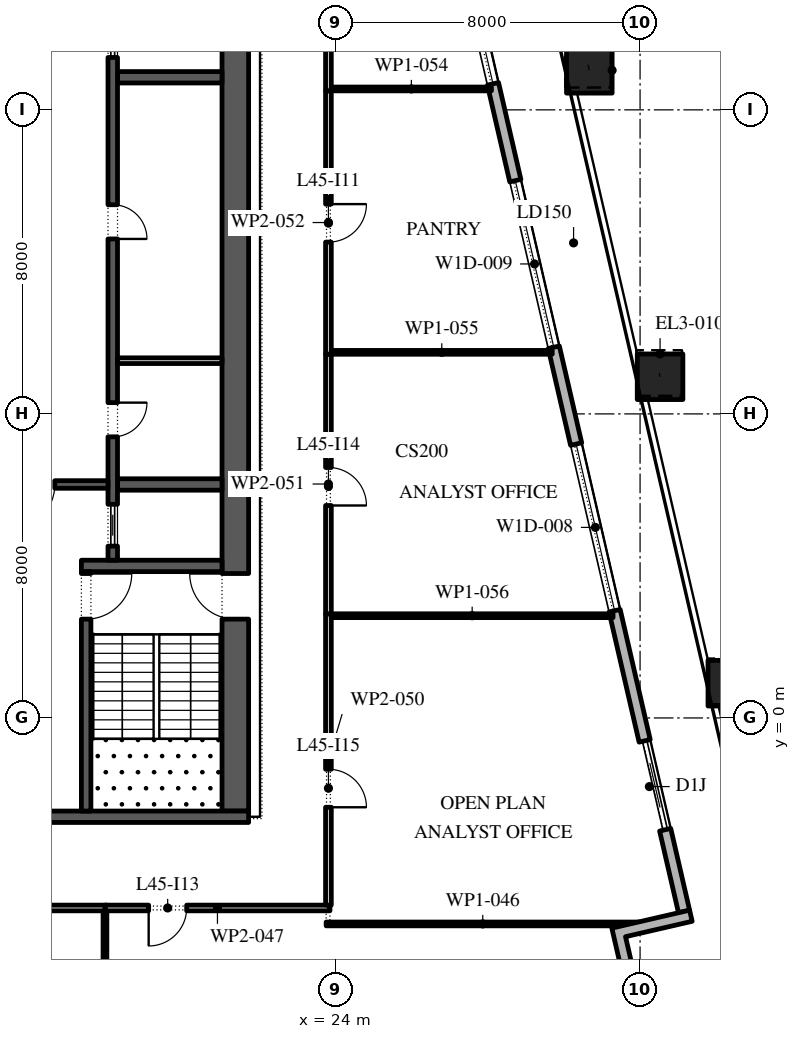
"""IFC4 building model, lengths in metres.
Left out: names, types, materials, properties, quantities, classifications, styles, units other than length and angle.
Written with IfcOpenShell. Run it as: python <this file> out.ifc"""

import sys

from ifc_helpers import new_model, si_unit, direction, frame, frame_2d, origin, origin_2d, place, context, subcontext, project, spatial, polyline, rectangle, outline, extrude, element, fill, save


model = new_model("IFC4")
c1 = context("Model", 3, precision=1e-05, world=origin(), true_north=direction((0.0, 1.0)))
c2 = subcontext(c1, "Body", "Model", "MODEL_VIEW")
j1 = project(units=[si_unit("LENGTHUNIT", "METRE"), si_unit("PLANEANGLEUNIT", "RADIAN")], contexts=[c1])
p1 = place(None, origin())
s1 = spatial("IfcSite", under=j1, at=p1, CompositionType="ELEMENT")
p2 = place(p1, origin())
s2 = spatial("IfcBuilding", under=s1, at=p2, CompositionType="ELEMENT")
p3 = place(p2, frame((0.0, 0.0, 205.2)))
s3 = spatial("IfcBuildingStorey", under=s2, at=p3, CompositionType="ELEMENT", Elevation=205.2)
p4 = place(p3, frame((34.388, 0.914, 0.0), z_axis=(-0.002731884952, 0.01168316756, 0.999928017609), x_axis=(-0.973733900744, -0.227689021567, 0.0)))
e1 = element("IfcColumn", 1, at=p4, inside=s3, PredefinedType="COLUMN", context=c2, shape_type="SweptSolid", body=[
    extrude(rectangle(XDim=1.2, YDim=1.2, at=origin_2d()), origin(), (0.0, 0.0, 1.0), 4.2),
])
p5 = place(p3, frame((32.526, 8.977, 0.0), z_axis=(-0.005404479485, 0.023361298418, 0.999712479335), x_axis=(-0.974268511785, -0.225390476607, 0.0)))
e2 = element("IfcColumn", 2, at=p5, inside=s3, PredefinedType="COLUMN", context=c2, shape_type="SweptSolid", body=[
    extrude(rectangle(XDim=1.2, YDim=1.2, at=origin_2d()), origin(), (0.0, 0.0, 1.0), 4.201),
])
p6 = place(p3, frame((30.665, 17.041, 0.0), z_axis=(-0.0080747472, 0.035087390713, 0.999351626541), x_axis=(-0.974526982896, -0.224270282488, 0.0)))
e3 = element("IfcColumn", 3, at=p6, inside=s3, PredefinedType="COLUMN", context=c2, shape_type="SweptSolid", body=[
    extrude(rectangle(XDim=1.2, YDim=1.2, at=origin_2d()), origin(), (0.0, 0.0, 1.0), 4.203),
])
p7 = place(p3, frame((33.157, -5.092, 0.0), z_axis=(0.0, 0.0, 1.0), x_axis=(-0.224950279389, 0.974370243697, 0.0)))
e4 = element("IfcWall", 4, at=p7, inside=s3, PredefinedType="STANDARD", context=c2, shape_type="SweptSolid", body=[
    extrude(rectangle(XDim=49.5, YDim=0.3, at=frame_2d((24.75, 0.0))), origin(), (0.0, 0.0, 1.0), 4.0),
])
p8 = place(p7, frame((2.207, 0.0, 0.0)))
e5 = element("IfcOpeningElement", 5, at=p8, cuts=e4, PredefinedType="OPENING", context=c2, shape_type="SweptSolid", body=[
    extrude(rectangle(XDim=2.4, YDim=3.125, at=frame_2d((1.2, 1.562))), frame((0.0, 0.16, 0.0), z_axis=(0.0, -1.0, 0.0), x_axis=(1.0, 0.0, 0.0)), (0.0, 0.0, 1.0), 0.32),
])
p9 = place(p7, frame((8.121, 0.0, 0.45)))
e6 = element("IfcOpeningElement", 6, at=p9, cuts=e4, PredefinedType="OPENING", context=c2, shape_type="SweptSolid", body=[
    extrude(rectangle(XDim=4.5, YDim=2.875, at=frame_2d((2.25, 1.438))), frame((0.0, 0.16, 0.0), z_axis=(0.0, -1.0, 0.0), x_axis=(1.0, 0.0, 0.0)), (0.0, 0.0, 1.0), 0.32),
])
p10 = place(p7, frame((15.236, 0.0, 0.45)))
e7 = element("IfcOpeningElement", 7, at=p10, cuts=e4, PredefinedType="OPENING", context=c2, shape_type="SweptSolid", body=[
    extrude(rectangle(XDim=4.5, YDim=2.875, at=frame_2d((2.25, 1.438))), frame((0.0, 0.16, 0.0), z_axis=(0.0, -1.0, 0.0), x_axis=(1.0, 0.0, 0.0)), (0.0, 0.0, 1.0), 0.32),
])
p11 = place(p7, frame((22.35, 0.0, 0.45)))
e8 = element("IfcOpeningElement", 8, at=p11, cuts=e4, PredefinedType="OPENING", context=c2, shape_type="SweptSolid", body=[
    extrude(rectangle(XDim=4.5, YDim=3.0, at=frame_2d((2.25, 1.5))), frame((0.0, 0.16, 0.0), z_axis=(0.0, -1.0, 0.0), x_axis=(1.0, 0.0, 0.0)), (0.0, 0.0, 1.0), 0.32),
])
p12 = place(p7, frame((30.514, 0.0, 0.0)))
e9 = element("IfcOpeningElement", 9, at=p12, cuts=e4, PredefinedType="OPENING", context=c2, shape_type="SweptSolid", body=[
    extrude(rectangle(XDim=2.4, YDim=3.45, at=frame_2d((1.2, 1.725))), frame((0.0, 0.16, 0.0), z_axis=(0.0, -1.0, 0.0), x_axis=(1.0, 0.0, 0.0)), (0.0, 0.0, 1.0), 0.32),
])
p13 = place(p7, frame((36.579, 0.0, 0.45)))
e10 = element("IfcOpeningElement", 10, at=p13, cuts=e4, PredefinedType="OPENING", context=c2, shape_type="SweptSolid", body=[
    extrude(rectangle(XDim=4.5, YDim=3.05, at=frame_2d((2.25, 1.525))), frame((0.0, 0.16, 0.0), z_axis=(0.0, -1.0, 0.0), x_axis=(1.0, 0.0, 0.0)), (0.0, 0.0, 1.0), 0.32),
])
p14 = place(p7, frame((43.693, 0.0, 0.45)))
e11 = element("IfcOpeningElement", 11, at=p14, cuts=e4, PredefinedType="OPENING", context=c2, shape_type="SweptSolid", body=[
    extrude(rectangle(XDim=4.5, YDim=3.05, at=frame_2d((2.25, 1.525))), frame((0.0, 0.16, 0.0), z_axis=(0.0, -1.0, 0.0), x_axis=(1.0, 0.0, 0.0)), (0.0, 0.0, 1.0), 0.32),
])
p15 = place(p3, origin())
e12 = element("IfcWall", 12, at=p15, inside=s3, PredefinedType="STANDARD", context=c2, shape_type="SweptSolid", body=[
    extrude(outline(polyline([(31.662, -7.285), (31.257, -5.531), (33.303, -5.058), (33.371, -5.351), (31.617, -5.756), (32.022, -7.51), (30.268, -7.914), (30.605, -9.376), (30.313, -9.443), (29.908, -7.69), (31.662, -7.285)])), origin(), (0.0, 0.0, 1.0), 4.0),
])
p16 = place(p3, frame((21.35, -2.45, 0.0), z_axis=(0.0, 0.0, 1.0), x_axis=(0.0, 1.0, 0.0)))
e13 = element("IfcWall", 13, at=p16, inside=s3, PredefinedType="SHEAR", context=c2, shape_type="SweptSolid", body=[
    extrude(rectangle(XDim=27.9, YDim=0.7, at=frame_2d((13.95, 0.0))), origin(), (0.0, 0.0, 1.0), 4.0),
])
p17 = place(p16, frame((5.05, 0.0, 0.0)))
e14 = element("IfcOpeningElement", 14, at=p17, cuts=e13, PredefinedType="OPENING", context=c2, shape_type="SweptSolid", body=[
    extrude(rectangle(XDim=1.2, YDim=2.1, at=frame_2d((0.6, 1.05))), frame((0.0, 0.36, 0.0), z_axis=(0.0, -1.0, 0.0), x_axis=(1.0, 0.0, 0.0)), (0.0, 0.0, 1.0), 0.72),
])
p18 = place(p16, frame((21.65, 0.0, 0.0)))
e15 = element("IfcOpeningElement", 15, at=p18, cuts=e13, PredefinedType="OPENING", context=c2, shape_type="SweptSolid", body=[
    extrude(rectangle(XDim=1.2, YDim=2.1, at=frame_2d((0.6, 1.05))), frame((0.0, 0.36, 0.0), z_axis=(0.0, -1.0, 0.0), x_axis=(1.0, 0.0, 0.0)), (0.0, 0.0, 1.0), 0.72),
])
p19 = place(p3, frame((10.3, -2.6, 0.0), z_axis=(0.0, 0.0, 1.0), x_axis=(1.0, 0.0, 0.0)))
e16 = element("IfcWall", 16, at=p19, inside=s3, PredefinedType="SHEAR", context=c2, shape_type="SweptSolid", body=[
    extrude(rectangle(XDim=11.4, YDim=0.3, at=frame_2d((5.7, 0.0))), origin(), (0.0, 0.0, 1.0), 4.0),
])
p20 = place(p3, frame((17.3, 4.0, 0.0), z_axis=(0.0, 0.0, 1.0), x_axis=(1.0, 0.0, 0.0)))
e17 = element("IfcWall", 17, at=p20, inside=s3, PredefinedType="SHEAR", context=c2, shape_type="SweptSolid", body=[
    extrude(rectangle(XDim=3.7, YDim=0.3, at=frame_2d((1.85, 0.0))), origin(), (0.0, 0.0, 1.0), 4.0),
])
p21 = place(p3, frame((17.425, -2.45, 0.0), z_axis=(0.0, 0.0, 1.0), x_axis=(0.0, 1.0, 0.0)))
e18 = element("IfcWall", 18, at=p21, inside=s3, PredefinedType="SHEAR", context=c2, shape_type="SweptSolid", body=[
    extrude(rectangle(XDim=6.3, YDim=0.25, at=frame_2d((3.15, 0.0))), origin(), (0.0, 0.0, 1.0), 4.0),
])
p22 = place(p21, frame((5.05, 0.0, 0.0)))
e19 = element("IfcOpeningElement", 19, at=p22, cuts=e18, PredefinedType="OPENING", context=c2, shape_type="SweptSolid", body=[
    extrude(rectangle(XDim=1.2, YDim=2.1, at=frame_2d((0.6, 1.05))), frame((0.0, 0.135, 0.0), z_axis=(0.0, -1.0, 0.0), x_axis=(1.0, 0.0, 0.0)), (0.0, 0.0, 1.0), 0.27),
])
for number, where, z_axis, x_axis in (
    (20, (18.25, 6.143, 0.0), (0.0, 0.0, 1.0), (1.0, 0.0, 0.0)),
    (21, (18.25, 16.857, 0.0), (0.0, 0.0, 1.0), (1.0, 0.0, 0.0)),
):
    element("IfcWall", number, at=place(p3, frame(where, z_axis=z_axis, x_axis=x_axis)), inside=s3, PredefinedType="SHEAR", context=c2, shape_type="SweptSolid", body=[
        extrude(rectangle(XDim=2.75, YDim=0.3, at=frame_2d((1.375, 0.0))), origin(), (0.0, 0.0, 1.0), 4.0),
    ])
p23 = place(p3, frame((18.125, 4.15, 0.0), z_axis=(0.0, 0.0, 1.0), x_axis=(0.0, 1.0, 0.0)))
e22 = element("IfcWall", 22, at=p23, inside=s3, PredefinedType="SHEAR", context=c2, shape_type="SweptSolid", body=[
    extrude(rectangle(XDim=14.7, YDim=0.25, at=frame_2d((7.35, 0.0))), origin(), (0.0, 0.0, 1.0), 4.0),
])
p24 = place(p23, frame((3.246, 0.0, 0.0)))
e23 = element("IfcOpeningElement", 23, at=p24, cuts=e22, PredefinedType="OPENING", context=c2, shape_type="SweptSolid", body=[
    extrude(rectangle(XDim=0.9, YDim=2.1, at=frame_2d((0.45, 1.05))), frame((0.0, 0.135, 0.0), z_axis=(0.0, -1.0, 0.0), x_axis=(1.0, 0.0, 0.0)), (0.0, 0.0, 1.0), 0.27),
])
p25 = place(p23, frame((8.454, 0.0, 0.0)))
e24 = element("IfcOpeningElement", 24, at=p25, cuts=e22, PredefinedType="OPENING", context=c2, shape_type="SweptSolid", body=[
    extrude(rectangle(XDim=0.9, YDim=2.1, at=frame_2d((0.45, 1.05))), frame((0.0, 0.135, 0.0), z_axis=(0.0, -1.0, 0.0), x_axis=(1.0, 0.0, 0.0)), (0.0, 0.0, 1.0), 0.27),
])
p26 = place(p23, frame((0.371, 0.0, 0.0)))
e25 = element("IfcOpeningElement", 25, at=p26, cuts=e22, PredefinedType="OPENING", context=c2, shape_type="SweptSolid", body=[
    extrude(rectangle(XDim=1.1, YDim=2.1, at=frame_2d((0.55, 1.05))), frame((0.0, 0.135, 0.0), z_axis=(0.0, -1.0, 0.0), x_axis=(1.0, 0.0, 0.0)), (0.0, 0.0, 1.0), 0.27),
])
p27 = place(p23, frame((13.229, 0.0, 0.0)))
e26 = element("IfcOpeningElement", 26, at=p27, cuts=e22, PredefinedType="OPENING", context=c2, shape_type="SweptSolid", body=[
    extrude(rectangle(XDim=1.1, YDim=2.1, at=frame_2d((0.55, 1.05))), frame((0.0, 0.135, 0.0), z_axis=(0.0, -1.0, 0.0), x_axis=(1.0, 0.0, 0.0)), (0.0, 0.0, 1.0), 0.27),
])
p28 = place(p3, frame((18.25, 9.4, 0.0), z_axis=(0.0, 0.0, 1.0), x_axis=(1.0, 0.0, 0.0)))
e27 = element("IfcWall", 27, at=p28, inside=s3, PredefinedType="PARTITIONING", context=c2, shape_type="SweptSolid", body=[
    extrude(rectangle(XDim=2.75, YDim=0.15, at=frame_2d((1.375, 0.0))), origin(), (0.0, 0.0, 1.0), 4.0),
])
p29 = place(p3, frame((14.0, 6.143, 0.0), z_axis=(0.0, 0.0, 1.0), x_axis=(1.0, 0.0, 0.0)))
e28 = element("IfcWall", 28, at=p29, inside=s3, PredefinedType="SHEAR", context=c2, shape_type="SweptSolid", body=[
    extrude(rectangle(XDim=4.0, YDim=0.2, at=frame_2d((2.0, 0.0))), origin(), (0.0, 0.0, 1.0), 4.0),
])
p30 = place(p29, frame((1.4, 0.0, 0.0)))
e29 = element("IfcOpeningElement", 29, at=p30, cuts=e28, PredefinedType="OPENING", context=c2, shape_type="SweptSolid", body=[
    extrude(rectangle(XDim=1.2, YDim=2.1, at=frame_2d((0.6, 1.05))), frame((0.0, 0.11, 0.0), z_axis=(0.0, -1.0, 0.0), x_axis=(1.0, 0.0, 0.0)), (0.0, 0.0, 1.0), 0.22),
])
p31 = place(p3, frame((17.97, -5.0, 0.0), z_axis=(0.0, 0.0, 1.0), x_axis=(-1.0, 0.0, 0.0)))
e30 = element("IfcWall", 30, at=p31, inside=s3, PredefinedType="PARTITIONING", context=c2, shape_type="SweptSolid", body=[
    extrude(rectangle(XDim=7.97, YDim=0.15, at=frame_2d((3.985, 0.0))), origin(), (0.0, 0.0, 1.0), 4.0),
])
p32 = place(p3, frame((17.92, -5.075, 0.0), z_axis=(0.0, 0.0, 1.0), x_axis=(0.0, -1.0, 0.0)))
e31 = element("IfcWall", 31, at=p32, inside=s3, PredefinedType="PARTITIONING", context=c2, shape_type="SweptSolid", body=[
    extrude(rectangle(XDim=7.312, YDim=0.1, at=frame_2d((3.656, 0.0))), origin(), (0.0, 0.0, 1.0), 4.0),
])
p33 = place(p3, frame((23.74, -5.42, 0.0), z_axis=(0.0, 0.0, 1.0), x_axis=(1.0, 0.0, 0.0)))
e32 = element("IfcWall", 32, at=p33, inside=s3, PredefinedType="PARTITIONING", context=c2, shape_type="SweptSolid", body=[
    extrude(rectangle(XDim=8.242, YDim=0.1, at=frame_2d((4.121, 0.0))), origin(), (0.0, 0.0, 1.0), 4.0),
])
p34 = place(p3, frame((23.84, -5.0, 0.0), z_axis=(0.0, 0.0, 1.0), x_axis=(-1.0, 0.0, 0.0)))
e33 = element("IfcWall", 33, at=p34, inside=s3, PredefinedType="PARTITIONING", context=c2, shape_type="SweptSolid", body=[
    extrude(rectangle(XDim=5.92, YDim=0.15, at=frame_2d((2.96, 0.0))), origin(), (0.0, 0.0, 1.0), 4.0),
])
p35 = place(p34, frame((3.77, 0.0, 0.0)))
e34 = element("IfcOpeningElement", 34, at=p35, cuts=e33, PredefinedType="OPENING", context=c2, shape_type="SweptSolid", body=[
    extrude(rectangle(XDim=1.0, YDim=2.1, at=frame_2d((0.5, 1.05))), frame((0.0, 0.085, 0.0), z_axis=(0.0, -1.0, 0.0), x_axis=(1.0, 0.0, 0.0)), (0.0, 0.0, 1.0), 0.17),
])
p36 = place(p3, frame((23.8, 2.74, 0.0), z_axis=(0.0, 0.0, 1.0), x_axis=(0.0, -1.0, 0.0)))
e35 = element("IfcWall", 35, at=p36, inside=s3, PredefinedType="PARTITIONING", context=c2, shape_type="SweptSolid", body=[
    extrude(rectangle(XDim=7.665, YDim=0.15, at=frame_2d((3.833, 0.0))), origin(), (0.0, 0.0, 1.0), 4.0),
])
p37 = place(p36, frame((4.09, 0.0, 0.0)))
e36 = element("IfcOpeningElement", 36, at=p37, cuts=e35, PredefinedType="OPENING", context=c2, shape_type="SweptSolid", body=[
    extrude(rectangle(XDim=1.0, YDim=2.1, at=frame_2d((0.5, 1.05))), frame((0.0, 0.085, 0.0), z_axis=(0.0, -1.0, 0.0), x_axis=(1.0, 0.0, 0.0)), (0.0, 0.0, 1.0), 0.17),
])
p38 = place(p3, frame((23.8, 9.57, 0.0), z_axis=(0.0, 0.0, 1.0), x_axis=(0.0, -1.0, 0.0)))
e37 = element("IfcWall", 37, at=p38, inside=s3, PredefinedType="PARTITIONING", context=c2, shape_type="SweptSolid", body=[
    extrude(rectangle(XDim=6.83, YDim=0.15, at=frame_2d((3.415, 0.0))), origin(), (0.0, 0.0, 1.0), 4.0),
])
p39 = place(p38, frame((2.98, 0.0, 0.0)))
e38 = element("IfcOpeningElement", 38, at=p39, cuts=e37, PredefinedType="OPENING", context=c2, shape_type="SweptSolid", body=[
    extrude(rectangle(XDim=1.0, YDim=2.1, at=frame_2d((0.5, 1.05))), frame((0.0, 0.085, 0.0), z_axis=(0.0, -1.0, 0.0), x_axis=(1.0, 0.0, 0.0)), (0.0, 0.0, 1.0), 0.17),
])
p40 = place(p3, frame((23.8, 16.5, 0.0), z_axis=(0.0, 0.0, 1.0), x_axis=(0.0, -1.0, 0.0)))
e39 = element("IfcWall", 39, at=p40, inside=s3, PredefinedType="PARTITIONING", context=c2, shape_type="SweptSolid", body=[
    extrude(rectangle(XDim=6.93, YDim=0.15, at=frame_2d((3.465, 0.0))), origin(), (0.0, 0.0, 1.0), 4.0),
])
p41 = place(p40, frame((2.98, 0.0, 0.0)))
e40 = element("IfcOpeningElement", 40, at=p41, cuts=e39, PredefinedType="OPENING", context=c2, shape_type="SweptSolid", body=[
    extrude(rectangle(XDim=1.0, YDim=2.1, at=frame_2d((0.5, 1.05))), frame((0.0, 0.085, 0.0), z_axis=(0.0, -1.0, 0.0), x_axis=(1.0, 0.0, 0.0)), (0.0, 0.0, 1.0), 0.17),
])
p42 = place(p3, frame((23.8, 27.2, 0.0), z_axis=(0.0, 0.0, 1.0), x_axis=(0.0, -1.0, 0.0)))
e41 = element("IfcWall", 41, at=p42, inside=s3, PredefinedType="PARTITIONING", context=c2, shape_type="SweptSolid", body=[
    extrude(rectangle(XDim=10.7, YDim=0.15, at=frame_2d((5.35, 0.0))), origin(), (0.0, 0.0, 1.0), 4.0),
])
p43 = place(p42, frame((6.0, 0.0, 0.0)))
e42 = element("IfcOpeningElement", 42, at=p43, cuts=e41, PredefinedType="OPENING", context=c2, shape_type="SweptSolid", body=[
    extrude(rectangle(XDim=1.0, YDim=2.1, at=frame_2d((0.5, 1.05))), frame((0.0, 0.085, 0.0), z_axis=(0.0, -1.0, 0.0), x_axis=(1.0, 0.0, 0.0)), (0.0, 0.0, 1.0), 0.17),
])
p44 = place(p3, frame((28.089, 16.55, 0.0), z_axis=(0.0, 0.0, 1.0), x_axis=(-1.0, 0.0, 0.0)))
e43 = element("IfcWall", 43, at=p44, inside=s3, PredefinedType="PARTITIONING", context=c2, shape_type="SweptSolid", body=[
    extrude(rectangle(XDim=4.214, YDim=0.1, at=frame_2d((2.107, 0.0))), origin(), (0.0, 0.0, 1.0), 4.0),
])
p45 = place(p3, frame((29.689, 9.62, 0.0), z_axis=(0.0, 0.0, 1.0), x_axis=(-1.0, 0.0, 0.0)))
e44 = element("IfcWall", 44, at=p45, inside=s3, PredefinedType="PARTITIONING", context=c2, shape_type="SweptSolid", body=[
    extrude(rectangle(XDim=5.814, YDim=0.1, at=frame_2d((2.907, 0.0))), origin(), (0.0, 0.0, 1.0), 4.0),
])
p46 = place(p3, frame((31.289, 2.69, 0.0), z_axis=(0.0, 0.0, 1.0), x_axis=(-1.0, 0.0, 0.0)))
e45 = element("IfcWall", 45, at=p46, inside=s3, PredefinedType="PARTITIONING", context=c2, shape_type="SweptSolid", body=[
    extrude(rectangle(XDim=7.414, YDim=0.1, at=frame_2d((3.707, 0.0))), origin(), (0.0, 0.0, 1.0), 4.0),
])
p47 = place(p8, origin())
e46 = element("IfcDoor", 46, at=p47, inside=s3, OperationType="DOUBLE_DOOR_SLIDING", PredefinedType="DOOR", context=c2, shape_type="SweptSolid", body=[
    extrude(rectangle(XDim=2.4, YDim=3.125, at=frame_2d((1.2, 1.562))), frame((0.0, 0.025, 0.0), z_axis=(0.0, -1.0, 0.0), x_axis=(1.0, 0.0, 0.0)), (0.0, 0.0, 1.0), 0.05),
])
fill(e5, e46)
p48 = place(p9, origin())
e47 = element("IfcWindow", 47, at=p48, inside=s3, PartitioningType="DOUBLE_PANEL_VERTICAL", PredefinedType="WINDOW", context=c2, shape_type="SweptSolid", body=[
    extrude(rectangle(XDim=4.5, YDim=2.875, at=frame_2d((2.25, 1.438))), frame((0.0, 0.03, 0.0), z_axis=(0.0, -1.0, 0.0), x_axis=(1.0, 0.0, 0.0)), (0.0, 0.0, 1.0), 0.06),
])
fill(e6, e47)
p49 = place(p10, origin())
e48 = element("IfcWindow", 48, at=p49, inside=s3, PartitioningType="DOUBLE_PANEL_VERTICAL", PredefinedType="WINDOW", context=c2, shape_type="SweptSolid", body=[
    extrude(rectangle(XDim=4.5, YDim=2.875, at=frame_2d((2.25, 1.438))), frame((0.0, 0.03, 0.0), z_axis=(0.0, -1.0, 0.0), x_axis=(1.0, 0.0, 0.0)), (0.0, 0.0, 1.0), 0.06),
])
fill(e7, e48)
p50 = place(p11, origin())
e49 = element("IfcWindow", 49, at=p50, inside=s3, PartitioningType="DOUBLE_PANEL_VERTICAL", PredefinedType="WINDOW", context=c2, shape_type="SweptSolid", body=[
    extrude(rectangle(XDim=4.5, YDim=3.0, at=frame_2d((2.25, 1.5))), frame((0.0, 0.03, 0.0), z_axis=(0.0, -1.0, 0.0), x_axis=(1.0, 0.0, 0.0)), (0.0, 0.0, 1.0), 0.06),
])
fill(e8, e49)
p51 = place(p24, frame((0.9, -0.2, 0.0), z_axis=(0.0, 0.0, 1.0), x_axis=(-1.0, 0.0, 0.0)))
e50 = element("IfcDoor", 50, at=p51, inside=s3, OperationType="SINGLE_SWING_RIGHT", PredefinedType="DOOR", context=c2, shape_type="SweptSolid", body=[
    extrude(rectangle(XDim=0.9, YDim=2.1, at=frame_2d((0.45, 1.05))), frame((0.0, -0.075, 0.0), z_axis=(0.0, -1.0, 0.0), x_axis=(1.0, 0.0, 0.0)), (0.0, 0.0, 1.0), 0.05),
])
fill(e23, e50)
p52 = place(p25, frame((0.9, -0.2, 0.0), z_axis=(0.0, 0.0, 1.0), x_axis=(-1.0, 0.0, 0.0)))
e51 = element("IfcDoor", 51, at=p52, inside=s3, OperationType="SINGLE_SWING_LEFT", PredefinedType="DOOR", context=c2, shape_type="SweptSolid", body=[
    extrude(rectangle(XDim=0.9, YDim=2.1, at=frame_2d((0.45, 1.05))), frame((0.0, -0.075, 0.0), z_axis=(0.0, -1.0, 0.0), x_axis=(1.0, 0.0, 0.0)), (0.0, 0.0, 1.0), 0.05),
])
fill(e24, e51)
p53 = place(p26, origin())
e52 = element("IfcDoor", 52, at=p53, inside=s3, OperationType="SLIDING_TO_LEFT", PredefinedType="DOOR", context=c2, shape_type="SweptSolid", body=[
    extrude(rectangle(XDim=1.1, YDim=2.1, at=frame_2d((0.55, 1.05))), frame((0.0, 0.025, 0.0), z_axis=(0.0, -1.0, 0.0), x_axis=(1.0, 0.0, 0.0)), (0.0, 0.0, 1.0), 0.05),
])
fill(e25, e52)
p54 = place(p27, origin())
e53 = element("IfcDoor", 53, at=p54, inside=s3, OperationType="SLIDING_TO_LEFT", PredefinedType="DOOR", context=c2, shape_type="SweptSolid", body=[
    extrude(rectangle(XDim=1.1, YDim=2.1, at=frame_2d((0.55, 1.05))), frame((0.0, 0.025, 0.0), z_axis=(0.0, -1.0, 0.0), x_axis=(1.0, 0.0, 0.0)), (0.0, 0.0, 1.0), 0.05),
])
fill(e26, e53)
p55 = place(p30, frame((1.2, 0.0, 0.0), z_axis=(0.0, 0.0, 1.0), x_axis=(-1.0, 0.0, 0.0)))
e54 = element("IfcDoor", 54, at=p55, inside=s3, OperationType="SINGLE_SWING_LEFT", PredefinedType="DOOR", context=c2, shape_type="SweptSolid", body=[
    extrude(rectangle(XDim=1.2, YDim=2.1, at=frame_2d((0.6, 1.05))), frame((0.0, 0.025, 0.0), z_axis=(0.0, -1.0, 0.0), x_axis=(1.0, 0.0, 0.0)), (0.0, 0.0, 1.0), 0.05),
])
fill(e29, e54)
p56 = place(p22, frame((1.2, 0.0, 0.0), z_axis=(0.0, 0.0, 1.0), x_axis=(-1.0, 0.0, 0.0)))
e55 = element("IfcDoor", 55, at=p56, inside=s3, OperationType="SINGLE_SWING_RIGHT", PredefinedType="DOOR", context=c2, shape_type="SweptSolid", body=[
    extrude(rectangle(XDim=1.2, YDim=2.1, at=frame_2d((0.6, 1.05))), frame((0.0, 0.025, 0.0), z_axis=(0.0, -1.0, 0.0), x_axis=(1.0, 0.0, 0.0)), (0.0, 0.0, 1.0), 0.05),
])
fill(e19, e55)
p57 = place(p17, origin())
e56 = element("IfcDoor", 56, at=p57, inside=s3, OperationType="SINGLE_SWING_LEFT", PredefinedType="DOOR", context=c2, shape_type="SweptSolid", body=[
    extrude(rectangle(XDim=1.2, YDim=2.1, at=frame_2d((0.6, 1.05))), frame((0.0, 0.025, 0.0), z_axis=(0.0, -1.0, 0.0), x_axis=(1.0, 0.0, 0.0)), (0.0, 0.0, 1.0), 0.05),
])
fill(e14, e56)
p58 = place(p41, origin())
e57 = element("IfcDoor", 57, at=p58, inside=s3, OperationType="SINGLE_SWING_RIGHT", PredefinedType="DOOR", context=c2, shape_type="SweptSolid", body=[
    extrude(rectangle(XDim=1.0, YDim=2.1, at=frame_2d((0.5, 1.05))), frame((0.0, 0.025, 0.0), z_axis=(0.0, -1.0, 0.0), x_axis=(1.0, 0.0, 0.0)), (0.0, 0.0, 1.0), 0.05),
])
fill(e40, e57)
p59 = place(p35, origin())
e58 = element("IfcDoor", 58, at=p59, inside=s3, OperationType="SINGLE_SWING_LEFT", PredefinedType="DOOR", context=c2, shape_type="SweptSolid", body=[
    extrude(rectangle(XDim=1.0, YDim=2.1, at=frame_2d((0.5, 1.05))), frame((0.0, 0.025, 0.0), z_axis=(0.0, -1.0, 0.0), x_axis=(1.0, 0.0, 0.0)), (0.0, 0.0, 1.0), 0.05),
])
fill(e34, e58)
p60 = place(p39, origin())
e59 = element("IfcDoor", 59, at=p60, inside=s3, OperationType="SINGLE_SWING_LEFT", PredefinedType="DOOR", context=c2, shape_type="SweptSolid", body=[
    extrude(rectangle(XDim=1.0, YDim=2.1, at=frame_2d((0.5, 1.05))), frame((0.0, 0.025, 0.0), z_axis=(0.0, -1.0, 0.0), x_axis=(1.0, 0.0, 0.0)), (0.0, 0.0, 1.0), 0.05),
])
fill(e38, e59)
p61 = place(p37, origin())
e60 = element("IfcDoor", 60, at=p61, inside=s3, OperationType="SINGLE_SWING_LEFT", PredefinedType="DOOR", context=c2, shape_type="SweptSolid", body=[
    extrude(rectangle(XDim=1.0, YDim=2.1, at=frame_2d((0.5, 1.05))), frame((0.0, 0.025, 0.0), z_axis=(0.0, -1.0, 0.0), x_axis=(1.0, 0.0, 0.0)), (0.0, 0.0, 1.0), 0.05),
])
fill(e36, e60)
save(model, sys.argv[1])
